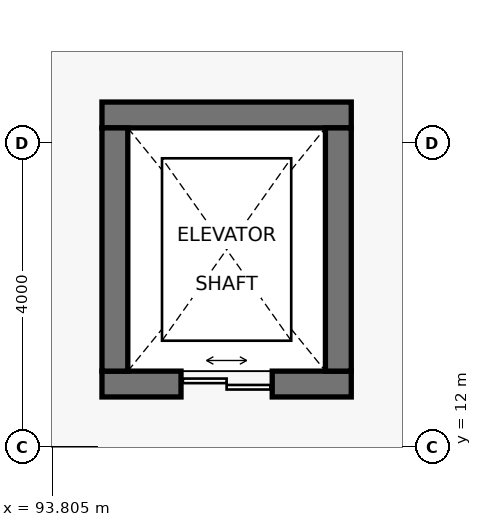
"""IFC4 building model, lengths in metres.
Left out: names, types, materials, properties, quantities, classifications, styles, units other than length and angle.
Written with IfcOpenShell. Run it as: python <this file> out.ifc"""

import sys

from ifc_helpers import new_model, si_unit, direction, frame, frame_2d, origin, place, context, subcontext, project, spatial, rectangle, extrude, element, fill, save


model = new_model("IFC4")
c1 = context("Model", 3, precision=1e-05, world=origin(), true_north=direction((0.0, 1.0)))
c2 = subcontext(c1, "Body", "Model", "MODEL_VIEW")
j1 = project(units=[si_unit("LENGTHUNIT", "METRE"), si_unit("PLANEANGLEUNIT", "RADIAN")], contexts=[c1])
p1 = place(None, origin())
s1 = spatial("IfcSite", under=j1, at=p1, CompositionType="ELEMENT")
p2 = place(p1, origin())
s2 = spatial("IfcBuilding", under=s1, at=p2, CompositionType="ELEMENT")
p3 = place(p2, frame((0.0, 0.0, -4.8)))
s3 = spatial("IfcBuildingStorey", under=s2, at=p3, CompositionType="ELEMENT", Elevation=-4.8)
p4 = place(p3, frame((94.46, 12.83, 0.0), z_axis=(0.0, 0.0, 1.0), x_axis=(1.0, 0.0, 0.0)))
e1 = element("IfcWall", 1, at=p4, inside=s3, PredefinedType="SHEAR", context=c2, shape_type="SweptSolid", body=[
    extrude(rectangle(XDim=3.28, YDim=0.34, at=frame_2d((1.64, 0.0))), origin(), (0.0, 0.0, 1.0), 4.4),
])
p5 = place(p4, frame((1.04, 0.0, 0.0)))
e2 = element("IfcOpeningElement", 2, at=p5, cuts=e1, PredefinedType="OPENING", context=c2, shape_type="SweptSolid", body=[
    extrude(rectangle(XDim=1.2, YDim=2.2, at=frame_2d((0.6, 1.1))), frame((0.0, 0.185, 0.0), z_axis=(0.0, -1.0, 0.0), x_axis=(1.0, 0.0, 0.0)), (0.0, 0.0, 1.0), 0.37),
])
p6 = place(p3, frame((97.74, 16.37, 0.0), z_axis=(0.0, 0.0, 1.0), x_axis=(-1.0, 0.0, 0.0)))
e3 = element("IfcWall", 3, at=p6, inside=s3, PredefinedType="SHEAR", context=c2, shape_type="SweptSolid", body=[
    extrude(rectangle(XDim=3.28, YDim=0.34, at=frame_2d((1.64, 0.0))), origin(), (0.0, 0.0, 1.0), 4.4),
])
for number, where, z_axis, x_axis in (
    (4, (94.63, 16.2, 0.0), (0.0, 0.0, 1.0), (0.0, -1.0, 0.0)),
    (5, (97.57, 13.0, 0.0), (0.0, 0.0, 1.0), (0.0, 1.0, 0.0)),
):
    element("IfcWall", number, at=place(p3, frame(where, z_axis=z_axis, x_axis=x_axis)), inside=s3, PredefinedType="SHEAR", context=c2, shape_type="SweptSolid", body=[
        extrude(rectangle(XDim=3.2, YDim=0.34, at=frame_2d((1.6, 0.0))), origin(), (0.0, 0.0, 1.0), 4.4),
    ])
p7 = place(p5, origin())
e6 = element("IfcDoor", 6, at=p7, inside=s3, OperationType="DOUBLE_DOOR_SLIDING", PredefinedType="DOOR", context=c2, shape_type="SweptSolid", body=[
    extrude(rectangle(XDim=1.2, YDim=2.2, at=frame_2d((0.6, 1.1))), frame((0.0, 0.025, 0.0), z_axis=(0.0, -1.0, 0.0), x_axis=(1.0, 0.0, 0.0)), (0.0, 0.0, 1.0), 0.05),
])
fill(e2, e6)
save(model, sys.argv[1])
